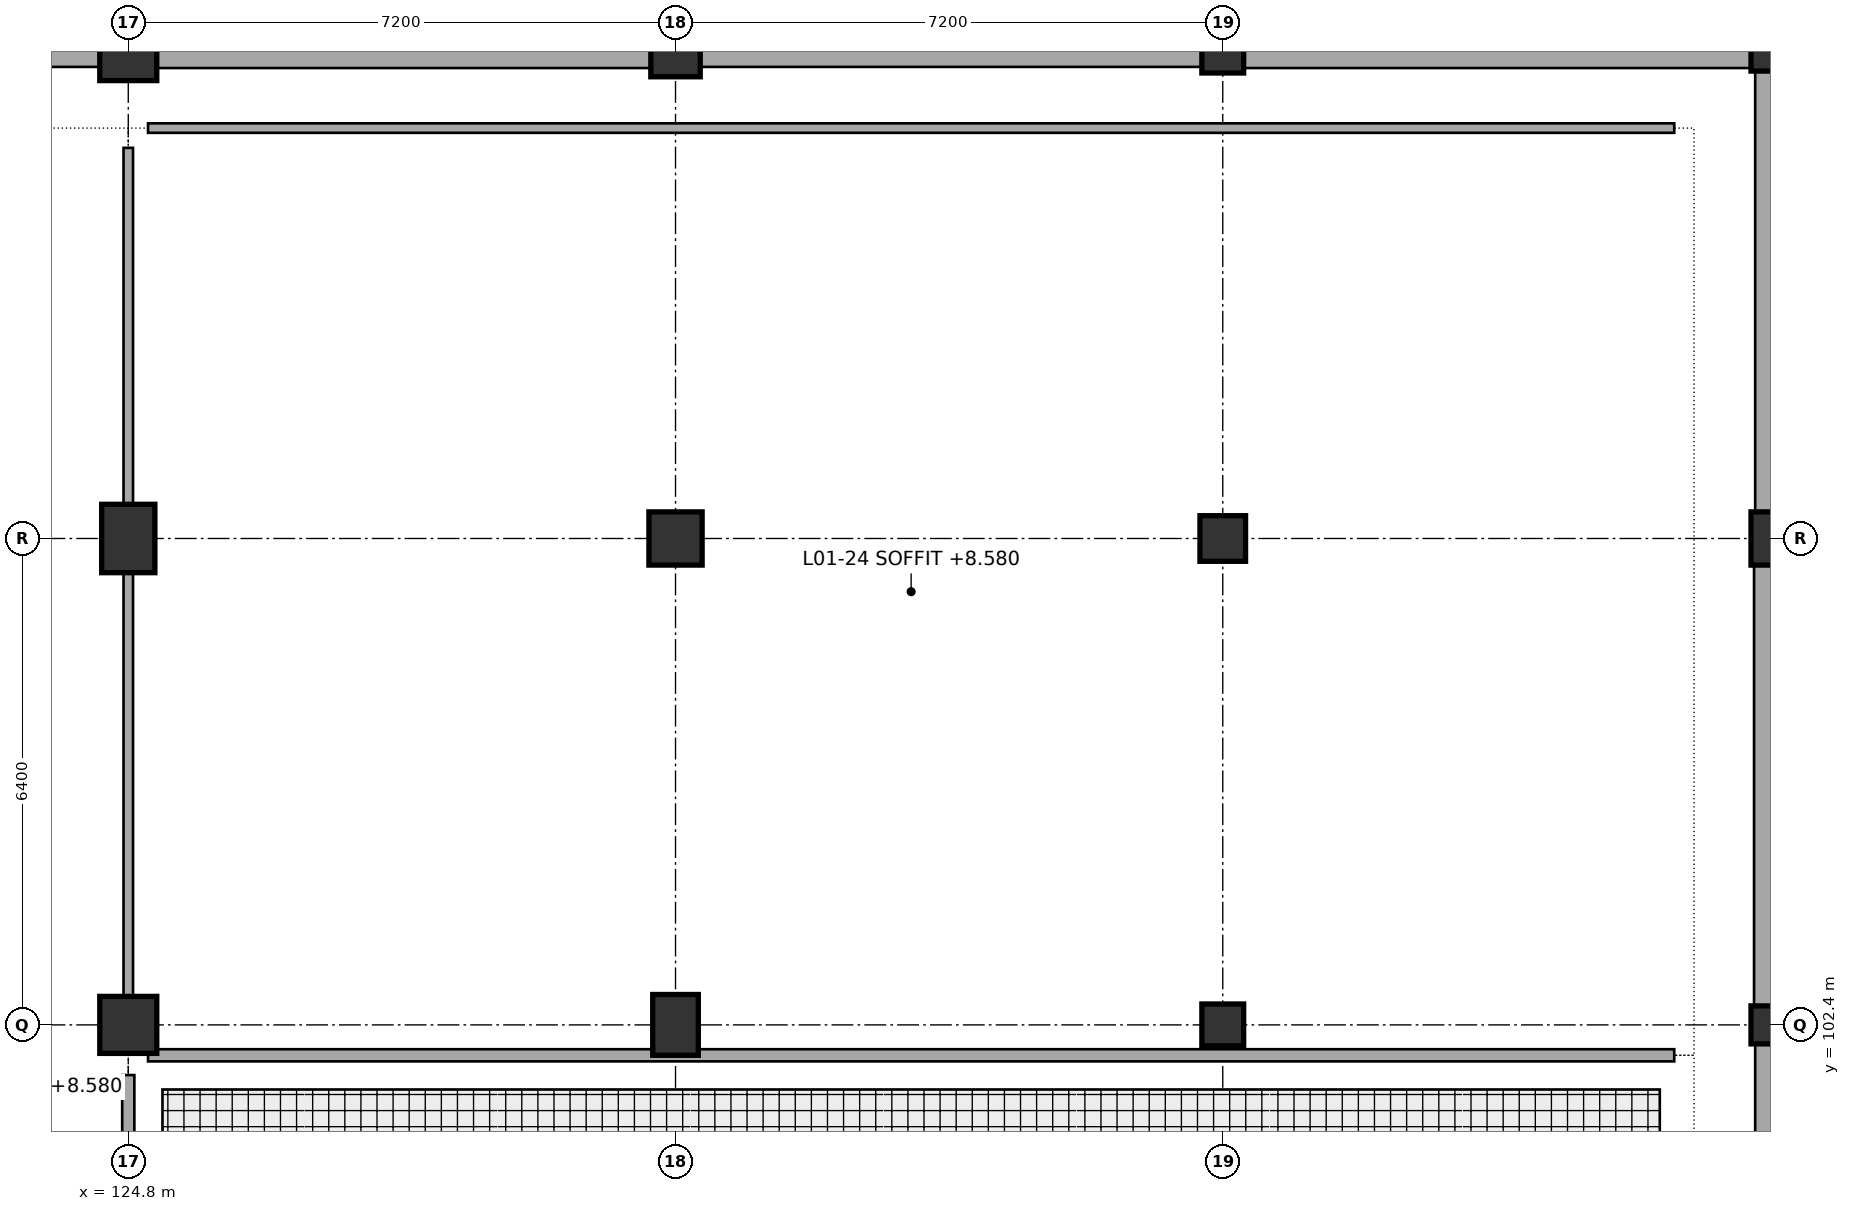
"""IFC4 building model, lengths in metres.
Left out: names, types, materials, properties, quantities, classifications, styles, units other than length and angle.
Written with IfcOpenShell. Run it as: python <this file> out.ifc"""

import sys

from ifc_helpers import new_model, si_unit, direction, frame, frame_2d, origin, origin_2d, place, context, subcontext, project, spatial, rectangle, extrude, element, fill, save


model = new_model("IFC4")
c1 = context("Model", 3, precision=1e-05, world=origin(), true_north=direction((0.0, 1.0)))
c2 = subcontext(c1, "Body", "Model", "MODEL_VIEW")
j1 = project(units=[si_unit("LENGTHUNIT", "METRE"), si_unit("PLANEANGLEUNIT", "RADIAN")], contexts=[c1])
p1 = place(None, origin())
s1 = spatial("IfcSite", under=j1, at=p1, CompositionType="ELEMENT")
p2 = place(p1, origin())
s2 = spatial("IfcBuilding", under=s1, at=p2, CompositionType="ELEMENT")
p3 = place(p2, frame((0.0, 0.0, 4.8)))
s3 = spatial("IfcBuildingStorey", under=s2, at=p3, CompositionType="ELEMENT", Elevation=4.8)
p4 = place(p3, frame((124.8, 102.4, 0.0), z_axis=(0.0, 0.0, 1.0), x_axis=(1.0, 0.0, 0.0)))
e1 = element("IfcColumn", 1, at=p4, inside=s3, PredefinedType="COLUMN", context=c2, shape_type="SweptSolid", body=[
    extrude(rectangle(XDim=0.75, YDim=0.75, at=origin_2d()), origin(), (0.0, 0.0, 1.0), 4.2),
])
p5 = place(p3, frame((124.8, 108.8, 0.0), z_axis=(0.0, 0.0, 1.0), x_axis=(1.0, 0.0, 0.0)))
e2 = element("IfcColumn", 2, at=p5, inside=s3, PredefinedType="COLUMN", context=c2, shape_type="SweptSolid", body=[
    extrude(rectangle(XDim=0.7, YDim=0.9, at=origin_2d()), origin(), (0.0, 0.0, 1.0), 4.2),
])
p6 = place(p3, frame((124.8, 115.2, 0.0), z_axis=(0.0, 0.0, 1.0), x_axis=(1.0, 0.0, 0.0)))
e3 = element("IfcColumn", 3, at=p6, inside=s3, PredefinedType="COLUMN", context=c2, shape_type="SweptSolid", body=[
    extrude(rectangle(XDim=0.75, YDim=0.75, at=origin_2d()), origin(), (0.0, 0.0, 1.0), 4.2),
])
p7 = place(p3, frame((132.0, 102.4, 0.0), z_axis=(0.0, 0.0, 1.0), x_axis=(1.0, 0.0, 0.0)))
e4 = element("IfcColumn", 4, at=p7, inside=s3, PredefinedType="COLUMN", context=c2, shape_type="SweptSolid", body=[
    extrude(rectangle(XDim=0.6, YDim=0.8, at=origin_2d()), origin(), (0.0, 0.0, 1.0), 4.2),
])
p8 = place(p3, frame((132.0, 108.8, 0.0), z_axis=(0.0, 0.0, 1.0), x_axis=(1.0, 0.0, 0.0)))
e5 = element("IfcColumn", 5, at=p8, inside=s3, PredefinedType="COLUMN", context=c2, shape_type="SweptSolid", body=[
    extrude(rectangle(XDim=0.7, YDim=0.7, at=origin_2d()), origin(), (0.0, 0.0, 1.0), 4.2),
])
p9 = place(p3, frame((132.0, 115.2, 0.0), z_axis=(0.0, 0.0, 1.0), x_axis=(1.0, 0.0, 0.0)))
e6 = element("IfcColumn", 6, at=p9, inside=s3, PredefinedType="COLUMN", context=c2, shape_type="SweptSolid", body=[
    extrude(rectangle(XDim=0.65, YDim=0.65, at=origin_2d()), origin(), (0.0, 0.0, 1.0), 4.2),
])
p10 = place(p3, frame((139.2, 102.4, 0.0), z_axis=(0.0, 0.0, 1.0), x_axis=(1.0, 0.0, 0.0)))
e7 = element("IfcColumn", 7, at=p10, inside=s3, PredefinedType="COLUMN", context=c2, shape_type="SweptSolid", body=[
    extrude(rectangle(XDim=0.55, YDim=0.55, at=origin_2d()), origin(), (0.0, 0.0, 1.0), 4.2),
])
p11 = place(p3, frame((139.2, 108.8, 0.0), z_axis=(0.0, 0.0, 1.0), x_axis=(1.0, 0.0, 0.0)))
e8 = element("IfcColumn", 8, at=p11, inside=s3, PredefinedType="COLUMN", context=c2, shape_type="SweptSolid", body=[
    extrude(rectangle(XDim=0.6, YDim=0.6, at=origin_2d()), origin(), (0.0, 0.0, 1.0), 4.2),
])
p12 = place(p3, frame((139.2, 115.2, 0.0), z_axis=(0.0, 0.0, 1.0), x_axis=(1.0, 0.0, 0.0)))
e9 = element("IfcColumn", 9, at=p12, inside=s3, PredefinedType="COLUMN", context=c2, shape_type="SweptSolid", body=[
    extrude(rectangle(XDim=0.55, YDim=0.55, at=origin_2d()), origin(), (0.0, 0.0, 1.0), 4.2),
])
p13 = place(p3, frame((146.4, 102.4, 0.0), z_axis=(0.0, 0.0, 1.0), x_axis=(1.0, 0.0, 0.0)))
e10 = element("IfcColumn", 10, at=p13, inside=s3, PredefinedType="COLUMN", context=c2, shape_type="SweptSolid", body=[
    extrude(rectangle(XDim=0.5, YDim=0.5, at=origin_2d()), origin(), (0.0, 0.0, 1.0), 4.2),
])
p14 = place(p3, frame((146.4, 108.8, 0.0), z_axis=(0.0, 0.0, 1.0), x_axis=(1.0, 0.0, 0.0)))
e11 = element("IfcColumn", 11, at=p14, inside=s3, PredefinedType="COLUMN", context=c2, shape_type="SweptSolid", body=[
    extrude(rectangle(XDim=0.5, YDim=0.7, at=origin_2d()), origin(), (0.0, 0.0, 1.0), 4.2),
])
p15 = place(p3, frame((146.4, 115.2, 0.0), z_axis=(0.0, 0.0, 1.0), x_axis=(1.0, 0.0, 0.0)))
e12 = element("IfcColumn", 12, at=p15, inside=s3, PredefinedType="COLUMN", context=c2, shape_type="SweptSolid", body=[
    extrude(rectangle(XDim=0.5, YDim=0.5, at=origin_2d()), origin(), (0.0, 0.0, 1.0), 4.2),
])
p16 = place(p3, frame((117.6, 115.2, 0.0), z_axis=(0.0, 0.0, 1.0), x_axis=(1.0, 0.0, 0.0)))
e13 = element("IfcWall", 13, at=p16, inside=s3, PredefinedType="STANDARD", context=c2, shape_type="SweptSolid", body=[
    extrude(rectangle(XDim=7.2, YDim=0.39, at=frame_2d((3.6, 0.0))), origin(), (0.0, 0.0, 1.0), 3.29),
])
p17 = place(p16, frame((2.7, 0.0, 0.8)))
e14 = element("IfcOpeningElement", 14, at=p17, cuts=e13, PredefinedType="OPENING", context=c2, shape_type="SweptSolid", body=[
    extrude(rectangle(XDim=1.8, YDim=1.65, at=frame_2d((0.9, 0.825))), frame((0.0, 0.205, 0.0), z_axis=(0.0, -1.0, 0.0), x_axis=(1.0, 0.0, 0.0)), (0.0, 0.0, 1.0), 0.41),
])
p18 = place(p3, frame((124.8, 115.2, 0.0), z_axis=(0.0, 0.0, 1.0), x_axis=(1.0, 0.0, 0.0)))
e15 = element("IfcWall", 15, at=p18, inside=s3, PredefinedType="STANDARD", context=c2, shape_type="SweptSolid", body=[
    extrude(rectangle(XDim=7.2, YDim=0.42, at=frame_2d((3.6, 0.0))), origin(), (0.0, 0.0, 1.0), 3.84),
])
p19 = place(p18, frame((2.55, 0.0, 0.8)))
e16 = element("IfcOpeningElement", 16, at=p19, cuts=e15, PredefinedType="OPENING", context=c2, shape_type="SweptSolid", body=[
    extrude(rectangle(XDim=2.1, YDim=1.65, at=frame_2d((1.05, 0.825))), frame((0.0, 0.22, 0.0), z_axis=(0.0, -1.0, 0.0), x_axis=(1.0, 0.0, 0.0)), (0.0, 0.0, 1.0), 0.44),
])
p20 = place(p3, frame((132.0, 115.2, 0.0), z_axis=(0.0, 0.0, 1.0), x_axis=(1.0, 0.0, 0.0)))
e17 = element("IfcWall", 17, at=p20, inside=s3, PredefinedType="STANDARD", context=c2, shape_type="SweptSolid", body=[
    extrude(rectangle(XDim=7.2, YDim=0.39, at=frame_2d((3.6, 0.0))), origin(), (0.0, 0.0, 1.0), 3.29),
])
p21 = place(p20, frame((2.4, 0.0, 0.8)))
e18 = element("IfcOpeningElement", 18, at=p21, cuts=e17, PredefinedType="OPENING", context=c2, shape_type="SweptSolid", body=[
    extrude(rectangle(XDim=2.4, YDim=1.65, at=frame_2d((1.2, 0.825))), frame((0.0, 0.205, 0.0), z_axis=(0.0, -1.0, 0.0), x_axis=(1.0, 0.0, 0.0)), (0.0, 0.0, 1.0), 0.41),
])
p22 = place(p3, frame((139.2, 115.2, 0.0), z_axis=(0.0, 0.0, 1.0), x_axis=(1.0, 0.0, 0.0)))
e19 = element("IfcWall", 19, at=p22, inside=s3, PredefinedType="STANDARD", context=c2, shape_type="SweptSolid", body=[
    extrude(rectangle(XDim=7.2, YDim=0.42, at=frame_2d((3.6, 0.0))), origin(), (0.0, 0.0, 1.0), 3.84),
])
p23 = place(p22, frame((3.0, 0.0, 0.8)))
e20 = element("IfcOpeningElement", 20, at=p23, cuts=e19, PredefinedType="OPENING", context=c2, shape_type="SweptSolid", body=[
    extrude(rectangle(XDim=1.2, YDim=1.45, at=frame_2d((0.6, 0.725))), frame((0.0, 0.22, 0.0), z_axis=(0.0, -1.0, 0.0), x_axis=(1.0, 0.0, 0.0)), (0.0, 0.0, 1.0), 0.44),
])
p24 = place(p3, frame((146.4, 115.2, 0.0), z_axis=(0.0, 0.0, 1.0), x_axis=(0.0, -1.0, 0.0)))
e21 = element("IfcWall", 21, at=p24, inside=s3, PredefinedType="STANDARD", context=c2, shape_type="SweptSolid", body=[
    extrude(rectangle(XDim=6.4, YDim=0.39, at=frame_2d((3.2, 0.0))), origin(), (0.0, 0.0, 1.0), 2.99),
])
p25 = place(p24, frame((2.45, 0.0, 0.8)))
e22 = element("IfcOpeningElement", 22, at=p25, cuts=e21, PredefinedType="OPENING", context=c2, shape_type="SweptSolid", body=[
    extrude(rectangle(XDim=1.5, YDim=1.45, at=frame_2d((0.75, 0.725))), frame((0.0, 0.205, 0.0), z_axis=(0.0, -1.0, 0.0), x_axis=(1.0, 0.0, 0.0)), (0.0, 0.0, 1.0), 0.41),
])
p26 = place(p3, frame((146.4, 108.8, 0.0), z_axis=(0.0, 0.0, 1.0), x_axis=(0.0, -1.0, 0.0)))
e23 = element("IfcWall", 23, at=p26, inside=s3, PredefinedType="STANDARD", context=c2, shape_type="SweptSolid", body=[
    extrude(rectangle(XDim=6.4, YDim=0.42, at=frame_2d((3.2, 0.0))), origin(), (0.0, 0.0, 1.0), 3.84),
])
p27 = place(p26, frame((2.3, 0.0, 0.8)))
e24 = element("IfcOpeningElement", 24, at=p27, cuts=e23, PredefinedType="OPENING", context=c2, shape_type="SweptSolid", body=[
    extrude(rectangle(XDim=1.8, YDim=1.45, at=frame_2d((0.9, 0.725))), frame((0.0, 0.22, 0.0), z_axis=(0.0, -1.0, 0.0), x_axis=(1.0, 0.0, 0.0)), (0.0, 0.0, 1.0), 0.44),
])
p28 = place(p3, frame((146.4, 102.4, 0.0), z_axis=(0.0, 0.0, 1.0), x_axis=(0.0, -1.0, 0.0)))
e25 = element("IfcWall", 25, at=p28, inside=s3, PredefinedType="STANDARD", context=c2, shape_type="SweptSolid", body=[
    extrude(rectangle(XDim=6.4, YDim=0.39, at=frame_2d((3.2, 0.0))), origin(), (0.0, 0.0, 1.0), 3.04),
])
p29 = place(p28, frame((2.15, 0.0, 0.8)))
e26 = element("IfcOpeningElement", 26, at=p29, cuts=e25, PredefinedType="OPENING", context=c2, shape_type="SweptSolid", body=[
    extrude(rectangle(XDim=2.1, YDim=1.45, at=frame_2d((1.05, 0.725))), frame((0.0, 0.205, 0.0), z_axis=(0.0, -1.0, 0.0), x_axis=(1.0, 0.0, 0.0)), (0.0, 0.0, 1.0), 0.41),
])
p30 = place(p3, frame((145.14, 102.0, 0.0), z_axis=(0.0, 0.0, 1.0), x_axis=(-1.0, 0.0, 0.0)))
e27 = element("IfcWall", 27, at=p30, inside=s3, PredefinedType="PARTITIONING", context=c2, shape_type="SweptSolid", body=[
    extrude(rectangle(XDim=20.08, YDim=0.16, at=frame_2d((10.04, 0.0))), origin(), (0.0, 0.0, 1.0), 3.015),
])
p31 = place(p3, frame((124.8, 101.74, 0.0), z_axis=(0.0, 0.0, 1.0), x_axis=(0.0, -1.0, 0.0)))
e28 = element("IfcWall", 28, at=p31, inside=s3, PredefinedType="PARTITIONING", context=c2, shape_type="SweptSolid", body=[
    extrude(rectangle(XDim=11.68, YDim=0.16, at=frame_2d((5.84, 0.0))), origin(), (0.0, 0.0, 1.0), 2.665),
])
p32 = place(p31, frame((6.84, 0.0, 0.0)))
e29 = element("IfcOpeningElement", 29, at=p32, cuts=e28, PredefinedType="OPENING", context=c2, shape_type="SweptSolid", body=[
    extrude(rectangle(XDim=1.2, YDim=2.15, at=frame_2d((0.6, 1.075))), frame((0.0, 0.09, 0.0), z_axis=(0.0, -1.0, 0.0), x_axis=(1.0, 0.0, 0.0)), (0.0, 0.0, 1.0), 0.18),
])
p33 = place(p3, frame((145.14, 114.2, 0.0), z_axis=(0.0, 0.0, 1.0), x_axis=(-1.0, 0.0, 0.0)))
e30 = element("IfcWall", 30, at=p33, inside=s3, PredefinedType="PARTITIONING", context=c2, shape_type="SweptSolid", body=[
    extrude(rectangle(XDim=20.08, YDim=0.125, at=frame_2d((10.04, 0.0))), origin(), (0.0, 0.0, 1.0), 3.84),
])
p34 = place(p3, frame((124.8, 113.94, 0.0), z_axis=(0.0, 0.0, 1.0), x_axis=(0.0, -1.0, 0.0)))
e31 = element("IfcWall", 31, at=p34, inside=s3, PredefinedType="PARTITIONING", context=c2, shape_type="SweptSolid", body=[
    extrude(rectangle(XDim=11.68, YDim=0.125, at=frame_2d((5.84, 0.0))), origin(), (0.0, 0.0, 1.0), 2.615),
])
p35 = place(p34, frame((6.15, 0.0, 0.0)))
e32 = element("IfcOpeningElement", 32, at=p35, cuts=e31, PredefinedType="OPENING", context=c2, shape_type="SweptSolid", body=[
    extrude(rectangle(XDim=0.98, YDim=2.1, at=frame_2d((0.49, 1.05))), frame((0.0, 0.073, 0.0), z_axis=(0.0, -1.0, 0.0), x_axis=(1.0, 0.0, 0.0)), (0.0, 0.0, 1.0), 0.145),
])
p36 = place(p19, origin())
e33 = element("IfcWindow", 33, at=p36, inside=s3, PartitioningType="SINGLE_PANEL", PredefinedType="WINDOW", context=c2, shape_type="SweptSolid", body=[
    extrude(rectangle(XDim=2.1, YDim=1.65, at=frame_2d((1.05, 0.825))), frame((0.0, 0.03, 0.0), z_axis=(0.0, -1.0, 0.0), x_axis=(1.0, 0.0, 0.0)), (0.0, 0.0, 1.0), 0.06),
])
fill(e16, e33)
p37 = place(p21, origin())
e34 = element("IfcWindow", 34, at=p37, inside=s3, PartitioningType="TRIPLE_PANEL_VERTICAL", PredefinedType="WINDOW", context=c2, shape_type="SweptSolid", body=[
    extrude(rectangle(XDim=2.4, YDim=1.65, at=frame_2d((1.2, 0.825))), frame((0.0, 0.03, 0.0), z_axis=(0.0, -1.0, 0.0), x_axis=(1.0, 0.0, 0.0)), (0.0, 0.0, 1.0), 0.06),
])
fill(e18, e34)
p38 = place(p23, origin())
e35 = element("IfcWindow", 35, at=p38, inside=s3, PartitioningType="SINGLE_PANEL", PredefinedType="WINDOW", context=c2, shape_type="SweptSolid", body=[
    extrude(rectangle(XDim=1.2, YDim=1.45, at=frame_2d((0.6, 0.725))), frame((0.0, 0.03, 0.0), z_axis=(0.0, -1.0, 0.0), x_axis=(1.0, 0.0, 0.0)), (0.0, 0.0, 1.0), 0.06),
])
fill(e20, e35)
p39 = place(p25, origin())
e36 = element("IfcWindow", 36, at=p39, inside=s3, PartitioningType="SINGLE_PANEL", PredefinedType="WINDOW", context=c2, shape_type="SweptSolid", body=[
    extrude(rectangle(XDim=1.5, YDim=1.45, at=frame_2d((0.75, 0.725))), frame((0.0, 0.03, 0.0), z_axis=(0.0, -1.0, 0.0), x_axis=(1.0, 0.0, 0.0)), (0.0, 0.0, 1.0), 0.06),
])
fill(e22, e36)
p40 = place(p27, origin())
e37 = element("IfcWindow", 37, at=p40, inside=s3, PartitioningType="SINGLE_PANEL", PredefinedType="WINDOW", context=c2, shape_type="SweptSolid", body=[
    extrude(rectangle(XDim=1.8, YDim=1.45, at=frame_2d((0.9, 0.725))), frame((0.0, 0.03, 0.0), z_axis=(0.0, -1.0, 0.0), x_axis=(1.0, 0.0, 0.0)), (0.0, 0.0, 1.0), 0.06),
])
fill(e24, e37)
p41 = place(p35, origin())
e38 = element("IfcDoor", 38, at=p41, inside=s3, OperationType="SINGLE_SWING_LEFT", PredefinedType="DOOR", context=c2, shape_type="SweptSolid", body=[
    extrude(rectangle(XDim=0.98, YDim=2.1, at=frame_2d((0.49, 1.05))), frame((0.0, 0.025, 0.0), z_axis=(0.0, -1.0, 0.0), x_axis=(1.0, 0.0, 0.0)), (0.0, 0.0, 1.0), 0.05),
])
fill(e32, e38)
save(model, sys.argv[1])
